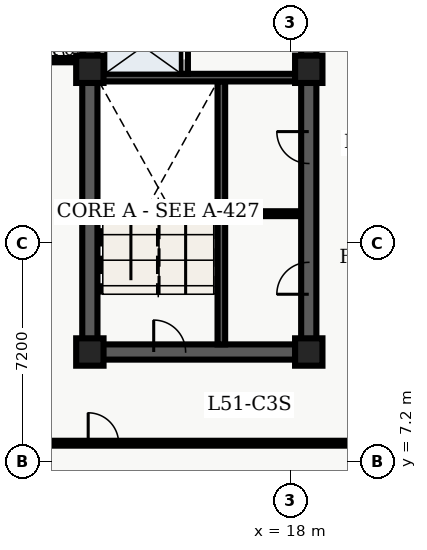
"""IFC4 building model, lengths in metres.
Left out: names, types, materials, properties, quantities, classifications, styles, units other than length and angle.
Written with IfcOpenShell. Run it as: python <this file> out.ifc"""

import sys

from ifc_helpers import new_model, entity, si_unit, converted_unit, direction, frame, origin_with_axes, origin_2d_with_axis, place, context, subcontext, project, spatial, polyline, rectangle, outline, extrude, element, fill, save


model = new_model("IFC4")
c1 = context("Model", 3, precision=1e-05, world=origin_with_axes(), true_north=direction((0.0, 1.0)))
c2 = subcontext(c1, "Body", "Model", "MODEL_VIEW")
j1 = project(units=[si_unit("LENGTHUNIT", "METRE"), converted_unit("PLANEANGLEUNIT", "DEGREE", entity("IfcPlaneAngleMeasure", 0.017), si_unit("PLANEANGLEUNIT", "RADIAN"), dimensions=[0, 0, 0, 0, 0, 0, 0])], contexts=[c1])
p1 = place(None, origin_with_axes())
s1 = spatial("IfcSite", under=j1, at=p1, CompositionType="ELEMENT")
p2 = place(p1, origin_with_axes())
s2 = spatial("IfcBuilding", under=s1, at=p2, CompositionType="ELEMENT")
p3 = place(p2, frame((0.0, 0.0, 208.2), z_axis=(0.0, 0.0, 1.0), x_axis=(1.0, 0.0, 0.0)))
s3 = spatial("IfcBuildingStorey", under=s2, at=p3, CompositionType="ELEMENT", Elevation=208.2)
p4 = place(p3, frame((11.4, 10.8, 0.0), z_axis=(0.0, 0.0, 1.0), x_axis=(0.0, 1.0, 0.0)))
e1 = element("IfcWall", 1, at=p4, inside=s3, PredefinedType="SHEAR", context=c2, shape_type="SweptSolid", body=[
    extrude(outline(polyline([(0.0, -0.25), (27.0, -0.25), (27.0, 0.25), (0.0, 0.25), (0.0, -0.25)])), origin_with_axes(), (0.0, 0.0, 1.0), 3.66),
])
p5 = place(p3, frame((11.4, 10.8, 0.0), z_axis=(0.0, 0.0, 1.0), x_axis=(1.0, 0.0, 0.0)))
e2 = element("IfcWall", 2, at=p5, inside=s3, PredefinedType="SHEAR", context=c2, shape_type="SweptSolid", body=[
    extrude(outline(polyline([(0.0, -0.25), (7.2, -0.25), (7.2, 0.25), (0.0, 0.25), (0.0, -0.25)])), origin_with_axes(), (0.0, 0.0, 1.0), 3.66),
])
p6 = place(p5, frame((2.625, 0.0, 0.0), z_axis=(0.0, 0.0, 1.0), x_axis=(1.0, 0.0, 0.0)))
e3 = element("IfcOpeningElement", 3, at=p6, cuts=e2, PredefinedType="OPENING", context=c2, shape_type="SweptSolid", body=[
    extrude(rectangle(XDim=1.05, YDim=0.52, at=origin_2d_with_axis()), origin_with_axes(), (0.0, 0.0, 1.0), 2.15),
])
p7 = place(p3, frame((18.6, 10.8, 0.0), z_axis=(0.0, 0.0, 1.0), x_axis=(0.0, 1.0, 0.0)))
e4 = element("IfcWall", 4, at=p7, inside=s3, PredefinedType="SHEAR", context=c2, shape_type="SweptSolid", body=[
    extrude(outline(polyline([(0.0, -0.25), (13.5, -0.25), (13.5, 0.25), (0.0, 0.25), (0.0, -0.25)])), origin_with_axes(), (0.0, 0.0, 1.0), 3.66),
])
p8 = place(p7, frame((11.125, 0.0, 0.0), z_axis=(0.0, 0.0, 1.0), x_axis=(1.0, 0.0, 0.0)))
e5 = element("IfcOpeningElement", 5, at=p8, cuts=e4, PredefinedType="OPENING", context=c2, shape_type="SweptSolid", body=[
    extrude(rectangle(XDim=1.05, YDim=0.52, at=origin_2d_with_axis()), origin_with_axes(), (0.0, 0.0, 1.0), 2.15),
])
p9 = place(p7, frame((2.425, 0.0, 0.0), z_axis=(0.0, 0.0, 1.0), x_axis=(1.0, 0.0, 0.0)))
e6 = element("IfcOpeningElement", 6, at=p9, cuts=e4, PredefinedType="OPENING", context=c2, shape_type="SweptSolid", body=[
    extrude(rectangle(XDim=1.05, YDim=0.52, at=origin_2d_with_axis()), origin_with_axes(), (0.0, 0.0, 1.0), 2.15),
])
p10 = place(p7, frame((6.725, 0.0, 0.0), z_axis=(0.0, 0.0, 1.0), x_axis=(1.0, 0.0, 0.0)))
e7 = element("IfcOpeningElement", 7, at=p10, cuts=e4, PredefinedType="OPENING", context=c2, shape_type="SweptSolid", body=[
    extrude(rectangle(XDim=1.05, YDim=0.52, at=origin_2d_with_axis()), origin_with_axes(), (0.0, 0.0, 1.0), 2.15),
])
p11 = place(p3, frame((15.725, 11.05, 0.0), z_axis=(0.0, 0.0, 1.0), x_axis=(0.0, 1.0, 0.0)))
e8 = element("IfcWall", 8, at=p11, inside=s3, PredefinedType="SHEAR", context=c2, shape_type="SweptSolid", body=[
    extrude(outline(polyline([(0.0, -0.125), (8.65, -0.125), (8.65, 0.125), (0.0, 0.125), (0.0, -0.125)])), origin_with_axes(), (0.0, 0.0, 1.0), 3.66),
])
p12 = place(p3, frame((11.65, 19.825, 0.0), z_axis=(0.0, 0.0, 1.0), x_axis=(1.0, 0.0, 0.0)))
e9 = element("IfcWall", 9, at=p12, inside=s3, PredefinedType="SHEAR", context=c2, shape_type="SweptSolid", body=[
    extrude(outline(polyline([(0.0, -0.125), (6.7, -0.125), (6.7, 0.125), (0.0, 0.125), (0.0, -0.125)])), origin_with_axes(), (0.0, 0.0, 1.0), 3.66),
])
p13 = place(p3, frame((14.5, 19.95, 0.0), z_axis=(0.0, 0.0, 1.0), x_axis=(0.0, 1.0, 0.0)))
e10 = element("IfcWall", 10, at=p13, inside=s3, PredefinedType="SOLIDWALL", context=c2, shape_type="SweptSolid", body=[
    extrude(outline(polyline([(0.0, -0.125), (6.25, -0.125), (6.25, 0.125), (0.0, 0.125), (0.0, -0.125)])), origin_with_axes(), (0.0, 0.0, 1.0), 2.7),
])
p14 = place(p13, frame((1.025, 0.0, 0.0), z_axis=(0.0, 0.0, 1.0), x_axis=(1.0, 0.0, 0.0)))
e11 = element("IfcOpeningElement", 11, at=p14, cuts=e10, PredefinedType="OPENING", context=c2, shape_type="SweptSolid", body=[
    extrude(rectangle(XDim=1.1, YDim=0.27, at=origin_2d_with_axis()), origin_with_axes(), (0.0, 0.0, 1.0), 2.15),
])
p15 = place(p13, frame((2.975, 0.0, 0.0), z_axis=(0.0, 0.0, 1.0), x_axis=(1.0, 0.0, 0.0)))
e12 = element("IfcOpeningElement", 12, at=p15, cuts=e10, PredefinedType="OPENING", context=c2, shape_type="SweptSolid", body=[
    extrude(rectangle(XDim=1.1, YDim=0.27, at=origin_2d_with_axis()), origin_with_axes(), (0.0, 0.0, 1.0), 2.15),
])
p16 = place(p13, frame((5.425, 0.0, 0.0), z_axis=(0.0, 0.0, 1.0), x_axis=(1.0, 0.0, 0.0)))
e13 = element("IfcOpeningElement", 13, at=p16, cuts=e10, PredefinedType="OPENING", context=c2, shape_type="SweptSolid", body=[
    extrude(rectangle(XDim=1.2, YDim=0.27, at=origin_2d_with_axis()), origin_with_axes(), (0.0, 0.0, 1.0), 2.15),
])
for number, where, z_axis, x_axis in (
    (14, (11.4, 10.8, 0.0), (0.0, 0.0, 1.0), (1.0, 0.0, 0.0)),
    (15, (11.4, 20.1, 0.0), (0.0, 0.0, 1.0), (1.0, 0.0, 0.0)),
    (16, (18.6, 10.8, 0.0), (0.0, 0.0, 1.0), (1.0, 0.0, 0.0)),
    (17, (18.6, 20.1, 0.0), (0.0, 0.0, 1.0), (1.0, 0.0, 0.0)),
):
    element("IfcColumn", number, at=place(p3, frame(where, z_axis=z_axis, x_axis=x_axis)), inside=s3, PredefinedType="COLUMN", context=c2, shape_type="SweptSolid", body=[
        extrude(rectangle(XDim=0.9, YDim=0.9, at=origin_2d_with_axis()), origin_with_axes(), (0.0, 0.0, 1.0), 3.9),
    ])
p17 = place(p3, frame((15.84, 15.35, 0.0), z_axis=(0.0, 0.0, 1.0), x_axis=(1.0, 0.0, 0.0)))
e18 = element("IfcWall", 18, at=p17, inside=s3, PredefinedType="PARTITIONING", context=c2, shape_type="SweptSolid", body=[
    extrude(outline(polyline([(0.0, -0.08), (2.46, -0.08), (2.46, 0.08), (0.0, 0.08), (0.0, -0.08)])), origin_with_axes(), (0.0, 0.0, 1.0), 2.7),
])
p18 = place(p3, frame((9.52, 20.4, 0.0), z_axis=(0.0, 0.0, 1.0), x_axis=(1.0, 0.0, 0.0)))
e19 = element("IfcWall", 19, at=p18, inside=s3, PredefinedType="PARTITIONING", context=c2, shape_type="SweptSolid", body=[
    extrude(outline(polyline([(0.0, -0.07), (1.58, -0.07), (1.58, 0.07), (0.0, 0.07), (0.0, -0.07)])), origin_with_axes(), (0.0, 0.0, 1.0), 2.7),
])
p19 = place(p18, frame((0.59, 0.0, 0.0), z_axis=(0.0, 0.0, 1.0), x_axis=(1.0, 0.0, 0.0)))
e20 = element("IfcOpeningElement", 20, at=p19, cuts=e19, PredefinedType="OPENING", context=c2, shape_type="SweptSolid", body=[
    extrude(rectangle(XDim=0.9, YDim=0.16, at=origin_2d_with_axis()), origin_with_axes(), (0.0, 0.0, 1.0), 2.15),
])
p20 = place(p3, frame((2.6, 7.8, 0.0), z_axis=(0.0, 0.0, 1.0), x_axis=(1.0, 0.0, 0.0)))
e21 = element("IfcWall", 21, at=p20, inside=s3, PredefinedType="PARTITIONING", context=c2, shape_type="SweptSolid", body=[
    extrude(outline(polyline([(0.0, -0.08), (18.55, -0.08), (18.55, 0.08), (0.0, 0.08), (0.0, -0.08)])), origin_with_axes(), (0.0, 0.0, 1.0), 2.7),
])
p21 = place(p20, frame((9.245, 0.0, 0.0), z_axis=(0.0, 0.0, 1.0), x_axis=(1.0, 0.0, 0.0)))
e22 = element("IfcOpeningElement", 22, at=p21, cuts=e21, PredefinedType="OPENING", context=c2, shape_type="SweptSolid", body=[
    extrude(rectangle(XDim=1.0, YDim=0.18, at=origin_2d_with_axis()), origin_with_axes(), (0.0, 0.0, 1.0), 2.15),
])
p22 = place(p13, frame((1.025, 0.0, 0.0), z_axis=(0.0, 0.0, 1.0), x_axis=(1.0, 0.0, 0.0)))
e23 = element("IfcDoor", 23, at=p22, inside=s3, OperationType="SLIDING_TO_LEFT", PredefinedType="DOOR", context=c2, shape_type="SweptSolid", body=[
    extrude(rectangle(XDim=1.1, YDim=0.09, at=origin_2d_with_axis()), origin_with_axes(), (0.0, 0.0, 1.0), 2.15),
])
fill(e11, e23)
p23 = place(p5, frame((2.625, 0.0, 0.0), z_axis=(0.0, 0.0, 1.0), x_axis=(1.0, 0.0, 0.0)))
e24 = element("IfcDoor", 24, at=p23, inside=s3, OperationType="SINGLE_SWING_LEFT", PredefinedType="DOOR", context=c2, shape_type="SweptSolid", body=[
    extrude(rectangle(XDim=1.05, YDim=0.09, at=origin_2d_with_axis()), origin_with_axes(), (0.0, 0.0, 1.0), 2.15),
])
fill(e3, e24)
p24 = place(p7, frame((2.425, 0.0, 0.0), z_axis=(0.0, 0.0, 1.0), x_axis=(1.0, 0.0, 0.0)))
e25 = element("IfcDoor", 25, at=p24, inside=s3, OperationType="SINGLE_SWING_LEFT", PredefinedType="DOOR", context=c2, shape_type="SweptSolid", body=[
    extrude(rectangle(XDim=1.05, YDim=0.09, at=origin_2d_with_axis()), origin_with_axes(), (0.0, 0.0, 1.0), 2.15),
])
fill(e6, e25)
p25 = place(p7, frame((6.725, 0.0, 0.0), z_axis=(0.0, 0.0, 1.0), x_axis=(1.0, 0.0, 0.0)))
e26 = element("IfcDoor", 26, at=p25, inside=s3, OperationType="SINGLE_SWING_RIGHT", PredefinedType="DOOR", context=c2, shape_type="SweptSolid", body=[
    extrude(rectangle(XDim=1.05, YDim=0.09, at=origin_2d_with_axis()), origin_with_axes(), (0.0, 0.0, 1.0), 2.15),
])
fill(e7, e26)
p26 = place(p18, frame((0.59, 0.0, 0.0), z_axis=(0.0, 0.0, 1.0), x_axis=(1.0, 0.0, 0.0)))
e27 = element("IfcDoor", 27, at=p26, inside=s3, OperationType="SINGLE_SWING_LEFT", PredefinedType="DOOR", context=c2, shape_type="SweptSolid", body=[
    extrude(rectangle(XDim=0.9, YDim=0.084, at=origin_2d_with_axis()), origin_with_axes(), (0.0, 0.0, 1.0), 2.15),
])
fill(e20, e27)
p27 = place(p20, frame((9.245, 0.0, 0.0), z_axis=(0.0, 0.0, 1.0), x_axis=(1.0, 0.0, 0.0)))
e28 = element("IfcDoor", 28, at=p27, inside=s3, OperationType="SINGLE_SWING_LEFT", PredefinedType="DOOR", context=c2, shape_type="SweptSolid", body=[
    extrude(rectangle(XDim=1.0, YDim=0.09, at=origin_2d_with_axis()), origin_with_axes(), (0.0, 0.0, 1.0), 2.15),
])
fill(e22, e28)
save(model, sys.argv[1])
